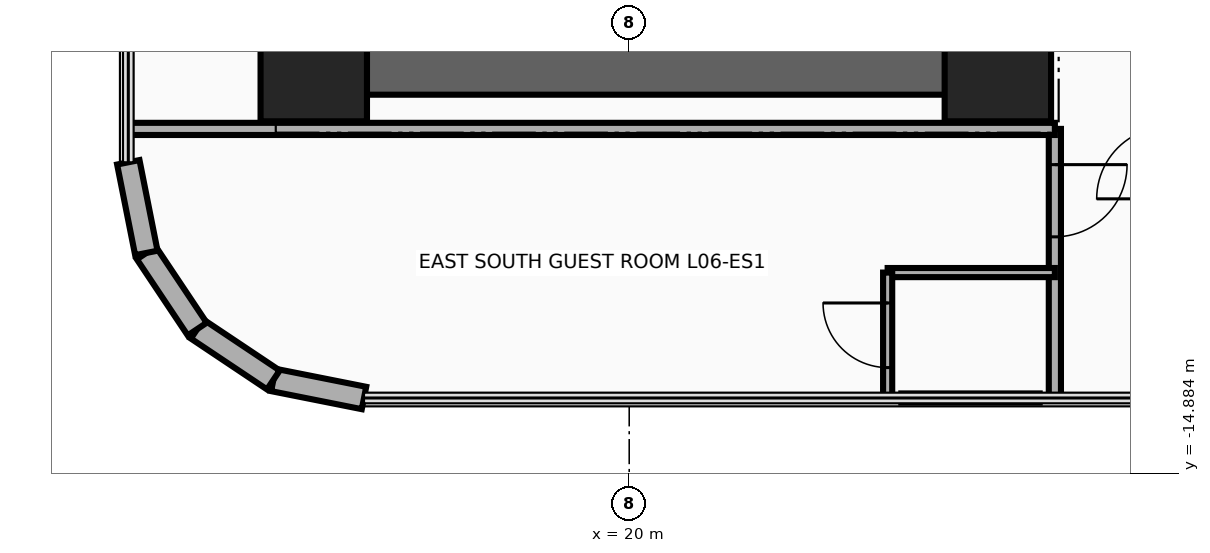
"""IFC4 building model, lengths in metres.
Left out: names, types, materials, properties, quantities, classifications, styles, units other than length and angle.
Written with IfcOpenShell. Run it as: python <this file> out.ifc"""

import sys

from ifc_helpers import new_model, si_unit, direction, frame, frame_2d, origin, origin_2d, place, context, subcontext, project, spatial, rectangle, extrude, source, transform, mapped, element, fill, save


model = new_model("IFC4")
c1 = context("Model", 3, precision=1e-05, world=origin(), true_north=direction((0.0, 1.0)))
c2 = subcontext(c1, "Body", "Model", "MODEL_VIEW")
j1 = project(units=[si_unit("LENGTHUNIT", "METRE"), si_unit("PLANEANGLEUNIT", "RADIAN")], contexts=[c1])
p1 = place(None, origin())
s1 = spatial("IfcSite", under=j1, at=p1, CompositionType="ELEMENT")
p2 = place(p1, origin())
s2 = spatial("IfcBuilding", under=s1, at=p2, CompositionType="ELEMENT")
p3 = place(p2, frame((0.0, 0.0, 29.7)))
s3 = spatial("IfcBuildingStorey", under=s2, at=p3, CompositionType="ELEMENT", Elevation=29.7)
p4 = place(p3, frame((24.85, -9.9, 0.0), z_axis=(0.0, 0.0, 1.0), x_axis=(0.0, 1.0, 0.0)))
e1 = element("IfcWall", 1, at=p4, inside=s3, PredefinedType="SHEAR", context=c2, shape_type="SweptSolid", body=[
    extrude(rectangle(XDim=8.95, YDim=0.7, at=frame_2d((4.475, 0.0))), origin(), (0.0, 0.0, 1.0), 3.46),
])
p5 = place(p3, frame((15.85, -9.55, 0.0), z_axis=(0.0, 0.0, 1.0), x_axis=(1.0, 0.0, 0.0)))
e2 = element("IfcWall", 2, at=p5, inside=s3, PredefinedType="SHEAR", context=c2, shape_type="SweptSolid", body=[
    extrude(rectangle(XDim=9.0, YDim=0.7, at=frame_2d((4.5, 0.0))), origin(), (0.0, 0.0, 1.0), 3.46),
])
m1 = source(origin(), c2, "Body", "SweptSolid", [
    extrude(rectangle(XDim=1.4, YDim=1.4, at=origin_2d()), origin(), (0.0, 0.0, 1.0), 3.7),
])
for number, where, z_axis, x_axis in (
    (3, (15.85, -9.55, 0.0), (0.0, 0.0, 1.0), (1.0, 0.0, 0.0)),
    (4, (24.85, -9.55, 0.0), (0.0, 0.0, 1.0), (1.0, 0.0, 0.0)),
):
    element("IfcColumn", number, at=place(p3, frame(where, z_axis=z_axis, x_axis=x_axis)), inside=s3, PredefinedType="COLUMN", context=c2, shape_type="MappedRepresentation", body=[
        mapped(m1, transform((0.0, 0.0, 0.0), x_axis=(1.0, 0.0, 0.0), y_axis=(0.0, 1.0, 0.0), z_axis=(0.0, 0.0, 1.0), scale=1.0)),
    ])
p6 = place(p3, frame((16.511, -13.89, 0.0), z_axis=(0.0, 0.0, 1.0), x_axis=(-0.980804027463, 0.194996050505, 0.0)))
e5 = element("IfcWall", 5, at=p6, inside=s3, PredefinedType="SOLIDWALL", context=c2, shape_type="SweptSolid", body=[
    extrude(rectangle(XDim=1.216, YDim=0.3, at=frame_2d((0.608, 0.0))), origin(), (0.0, 0.0, 1.0), 3.46),
])
for number, where, z_axis, x_axis in (
    (6, (15.318, -13.653, 0.0), (0.0, 0.0, 1.0), (-0.831, 0.556, 0.0)),
    (7, (14.317, -12.983, 0.0), (0.0, 0.0, 1.0), (-0.556, 0.831, 0.0)),
):
    element("IfcWall", number, at=place(p3, frame(where, z_axis=z_axis, x_axis=x_axis)), inside=s3, PredefinedType="SOLIDWALL", context=c2, shape_type="SweptSolid", body=[
        extrude(rectangle(XDim=1.205, YDim=0.3, at=frame_2d((0.603, 0.0))), origin(), (0.0, 0.0, 1.0), 3.46),
    ])
p7 = place(p3, frame((13.647, -11.982, 0.0), z_axis=(0.0, 0.0, 1.0), x_axis=(-0.195189223115, 0.980765602568, 0.0)))
e8 = element("IfcWall", 8, at=p7, inside=s3, PredefinedType="SOLIDWALL", context=c2, shape_type="SweptSolid", body=[
    extrude(rectangle(XDim=1.216, YDim=0.3, at=frame_2d((0.608, 0.0))), origin(), (0.0, 0.0, 1.0), 3.46),
])
p8 = place(p3, frame((25.6, -13.89, 0.0), z_axis=(0.0, 0.0, 1.0), x_axis=(0.0, 1.0, 0.0)))
e9 = element("IfcWall", 9, at=p8, inside=s3, PredefinedType="PARTITIONING", context=c2, shape_type="SweptSolid", body=[
    extrude(rectangle(XDim=3.54, YDim=0.16, at=frame_2d((1.77, 0.0))), origin(), (0.0, 0.0, 1.0), 3.46),
])
p9 = place(p8, frame((2.12, 0.0, 0.0)))
e10 = element("IfcOpeningElement", 10, at=p9, cuts=e9, PredefinedType="OPENING", context=c2, shape_type="SweptSolid", body=[
    extrude(rectangle(XDim=0.95, YDim=2.15, at=frame_2d((0.475, 1.075))), frame((0.0, 0.095, 0.0), z_axis=(0.0, -1.0, 0.0), x_axis=(1.0, 0.0, 0.0)), (0.0, 0.0, 1.0), 0.19),
])
p10 = place(p3, frame((13.41, -10.35, 0.0), z_axis=(0.0, 0.0, 1.0), x_axis=(1.0, 0.0, 0.0)))
e11 = element("IfcWall", 11, at=p10, inside=s3, PredefinedType="PARTITIONING", context=c2, shape_type="SweptSolid", body=[
    extrude(rectangle(XDim=12.19, YDim=0.16, at=frame_2d((6.095, 0.0))), origin(), (0.0, 0.0, 1.0), 3.46),
])
p11 = place(p3, frame((23.4, -12.24, 0.0), z_axis=(0.0, 0.0, 1.0), x_axis=(1.0, 0.0, 0.0)))
e12 = element("IfcWall", 12, at=p11, inside=s3, PredefinedType="PARTITIONING", context=c2, shape_type="SweptSolid", body=[
    extrude(rectangle(XDim=2.2, YDim=0.12, at=frame_2d((1.1, 0.0))), origin(), (0.0, 0.0, 1.0), 3.46),
])
p12 = place(p3, frame((23.4, -13.89, 0.0), z_axis=(0.0, 0.0, 1.0), x_axis=(0.0, 1.0, 0.0)))
e13 = element("IfcWall", 13, at=p12, inside=s3, PredefinedType="PARTITIONING", context=c2, shape_type="SweptSolid", body=[
    extrude(rectangle(XDim=1.65, YDim=0.12, at=frame_2d((0.825, 0.0))), origin(), (0.0, 0.0, 1.0), 3.46),
])
p13 = place(p12, frame((0.4, 0.0, 0.0)))
e14 = element("IfcOpeningElement", 14, at=p13, cuts=e13, PredefinedType="OPENING", context=c2, shape_type="SweptSolid", body=[
    extrude(rectangle(XDim=0.85, YDim=2.1, at=frame_2d((0.425, 1.05))), frame((0.0, 0.075, 0.0), z_axis=(0.0, -1.0, 0.0), x_axis=(1.0, 0.0, 0.0)), (0.0, 0.0, 1.0), 0.15),
])
p14 = place(p3, frame((23.58, -13.89, 0.0), z_axis=(0.0, 0.0, 1.0), x_axis=(1.0, 0.0, 0.0)))
e15 = element("IfcWall", 15, at=p14, inside=s3, PredefinedType="PARTITIONING", context=c2, shape_type="SweptSolid", body=[
    extrude(rectangle(XDim=1.82, YDim=0.12, at=frame_2d((0.91, 0.0))), origin(), (0.0, 0.0, 1.0), 3.46),
])
p15 = place(p9, frame((0.95, 0.0, 0.0), z_axis=(0.0, 0.0, 1.0), x_axis=(-1.0, 0.0, 0.0)))
e16 = element("IfcDoor", 16, at=p15, inside=s3, OperationType="SINGLE_SWING_LEFT", PredefinedType="DOOR", context=c2, shape_type="SweptSolid", body=[
    extrude(rectangle(XDim=0.95, YDim=2.15, at=frame_2d((0.475, 1.075))), frame((0.0, 0.025, 0.0), z_axis=(0.0, -1.0, 0.0), x_axis=(1.0, 0.0, 0.0)), (0.0, 0.0, 1.0), 0.05),
])
fill(e10, e16)
p16 = place(p13, origin())
e17 = element("IfcDoor", 17, at=p16, inside=s3, OperationType="SINGLE_SWING_RIGHT", PredefinedType="DOOR", context=c2, shape_type="SweptSolid", body=[
    extrude(rectangle(XDim=0.85, YDim=2.1, at=frame_2d((0.425, 1.05))), frame((0.0, 0.025, 0.0), z_axis=(0.0, -1.0, 0.0), x_axis=(1.0, 0.0, 0.0)), (0.0, 0.0, 1.0), 0.05),
])
fill(e14, e17)
save(model, sys.argv[1])
